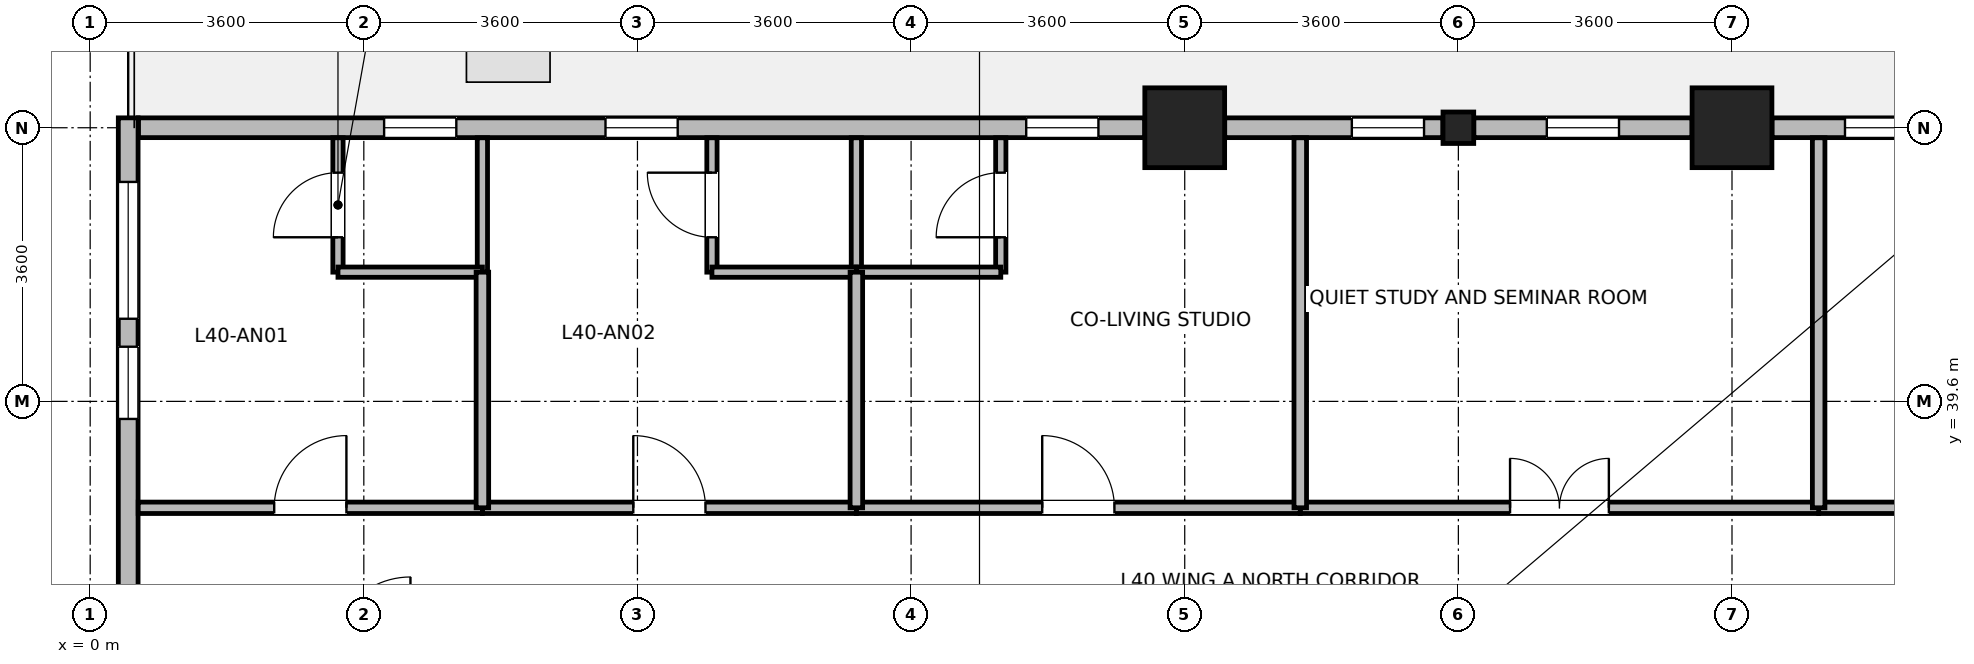
"""IFC4 building model, lengths in metres.
Left out: names, types, materials, properties, quantities, classifications, styles, units other than length and angle.
Written with IfcOpenShell. Run it as: python <this file> out.ifc"""

import sys

from ifc_helpers import new_model, si_unit, direction, frame, frame_2d, origin, origin_2d, place, context, subcontext, project, spatial, rectangle, i_section, extrude, source, transform, mapped, element, fill, save


model = new_model("IFC4")
c1 = context("Model", 3, precision=1e-05, world=origin(), true_north=direction((0.0, 1.0)))
c2 = subcontext(c1, "Body", "Model", "MODEL_VIEW")
j1 = project(units=[si_unit("LENGTHUNIT", "METRE"), si_unit("PLANEANGLEUNIT", "RADIAN")], contexts=[c1])
p1 = place(None, origin())
s1 = spatial("IfcSite", under=j1, at=p1, CompositionType="ELEMENT")
p2 = place(p1, origin())
s2 = spatial("IfcBuilding", under=s1, at=p2, CompositionType="ELEMENT")
p3 = place(p2, frame((0.0, 0.0, 158.7)))
s3 = spatial("IfcBuildingStorey", under=s2, at=p3, CompositionType="ELEMENT", Elevation=158.7)
m1 = source(origin(), c2, "Body", "SweptSolid", [
    extrude(rectangle(XDim=1.05, YDim=1.05, at=origin_2d()), origin(), (0.0, 0.0, 1.0), 3.7),
])
for number, where, z_axis, x_axis in (
    (1, (14.4, 43.2, 0.0), (0.0, 0.0, 1.0), (1.0, 0.0, 0.0)),
    (2, (21.6, 43.2, 0.0), (0.0, 0.0, 1.0), (1.0, 0.0, 0.0)),
):
    element("IfcColumn", number, at=place(p3, frame(where, z_axis=z_axis, x_axis=x_axis)), inside=s3, PredefinedType="COLUMN", context=c2, shape_type="MappedRepresentation", body=[
        mapped(m1, transform((0.0, 0.0, 0.0), x_axis=(1.0, 0.0, 0.0), y_axis=(0.0, 1.0, 0.0), z_axis=(0.0, 0.0, 1.0), scale=1.0)),
    ])
m2 = source(origin(), c2, "Body", "SweptSolid", [
    extrude(i_section(OverallWidth=0.404, OverallDepth=0.414, WebThickness=0.021, FlangeThickness=0.028, FilletRadius=0.015, at=origin_2d()), origin(), (0.0, 0.0, 1.0), 3.7),
])
p4 = place(p3, frame((18.0, 43.2, 0.0), z_axis=(0.0, 0.0, 1.0), x_axis=(1.0, 0.0, 0.0)))
e3 = element("IfcColumn", 3, at=p4, inside=s3, PredefinedType="COLUMN", context=c2, shape_type="MappedRepresentation", body=[
    mapped(m2, transform((0.0, 0.0, 0.0), x_axis=(1.0, 0.0, 0.0), y_axis=(0.0, 1.0, 0.0), z_axis=(0.0, 0.0, 1.0), scale=1.0)),
])
p5 = place(p3, frame((22.126, 43.2, 0.0), z_axis=(0.0, 0.0, 1.0), x_axis=(1.0, 0.0, 0.0)))
e4 = element("IfcWall", 4, at=p5, inside=s3, PredefinedType="STANDARD", context=c2, shape_type="SweptSolid", body=[
    extrude(rectangle(XDim=2.871, YDim=0.26, at=frame_2d((1.436, 0.0))), origin(), (0.0, 0.0, 1.0), 2.99),
])
p6 = place(p5, frame((0.96, 0.0, 0.85)))
e5 = element("IfcOpeningElement", 5, at=p6, cuts=e4, PredefinedType="OPENING", context=c2, shape_type="SweptSolid", body=[
    extrude(rectangle(XDim=0.95, YDim=1.75, at=frame_2d((0.475, 0.875))), frame((0.0, 0.14, 0.0), z_axis=(0.0, -1.0, 0.0), x_axis=(1.0, 0.0, 0.0)), (0.0, 0.0, 1.0), 0.28),
])
p7 = place(p3, frame((18.203, 43.2, 0.0), z_axis=(0.0, 0.0, 1.0), x_axis=(1.0, 0.0, 0.0)))
e6 = element("IfcWall", 6, at=p7, inside=s3, PredefinedType="STANDARD", context=c2, shape_type="SweptSolid", body=[
    extrude(rectangle(XDim=2.871, YDim=0.26, at=frame_2d((1.436, 0.0))), origin(), (0.0, 0.0, 1.0), 2.99),
])
p8 = place(p7, frame((0.96, 0.0, 0.85)))
e7 = element("IfcOpeningElement", 7, at=p8, cuts=e6, PredefinedType="OPENING", context=c2, shape_type="SweptSolid", body=[
    extrude(rectangle(XDim=0.95, YDim=1.75, at=frame_2d((0.475, 0.875))), frame((0.0, 0.14, 0.0), z_axis=(0.0, -1.0, 0.0), x_axis=(1.0, 0.0, 0.0)), (0.0, 0.0, 1.0), 0.28),
])
p9 = place(p3, frame((14.926, 43.2, 0.0), z_axis=(0.0, 0.0, 1.0), x_axis=(1.0, 0.0, 0.0)))
e8 = element("IfcWall", 8, at=p9, inside=s3, PredefinedType="STANDARD", context=c2, shape_type="SweptSolid", body=[
    extrude(rectangle(XDim=2.871, YDim=0.26, at=frame_2d((1.436, 0.0))), origin(), (0.0, 0.0, 1.0), 2.99),
])
p10 = place(p9, frame((1.673, 0.0, 0.85)))
e9 = element("IfcOpeningElement", 9, at=p10, cuts=e8, PredefinedType="OPENING", context=c2, shape_type="SweptSolid", body=[
    extrude(rectangle(XDim=0.95, YDim=1.75, at=frame_2d((0.475, 0.875))), frame((0.0, 0.14, 0.0), z_axis=(0.0, -1.0, 0.0), x_axis=(1.0, 0.0, 0.0)), (0.0, 0.0, 1.0), 0.28),
])
p11 = place(p3, frame((0.635, 43.2, 0.0), z_axis=(0.0, 0.0, 1.0), x_axis=(1.0, 0.0, 0.0)))
e10 = element("IfcWall", 10, at=p11, inside=s3, PredefinedType="STANDARD", context=c2, shape_type="SweptSolid", body=[
    extrude(rectangle(XDim=13.239, YDim=0.26, at=frame_2d((6.62, 0.0))), origin(), (0.0, 0.0, 1.0), 3.44),
])
p12 = place(p11, frame((6.145, 0.0, 0.85)))
e11 = element("IfcOpeningElement", 11, at=p12, cuts=e10, PredefinedType="OPENING", context=c2, shape_type="SweptSolid", body=[
    extrude(rectangle(XDim=0.95, YDim=1.75, at=frame_2d((0.475, 0.875))), frame((0.0, 0.14, 0.0), z_axis=(0.0, -1.0, 0.0), x_axis=(1.0, 0.0, 0.0)), (0.0, 0.0, 1.0), 0.28),
])
p13 = place(p11, frame((3.232, 0.0, 0.85)))
e12 = element("IfcOpeningElement", 12, at=p13, cuts=e10, PredefinedType="OPENING", context=c2, shape_type="SweptSolid", body=[
    extrude(rectangle(XDim=0.95, YDim=1.75, at=frame_2d((0.475, 0.875))), frame((0.0, 0.14, 0.0), z_axis=(0.0, -1.0, 0.0), x_axis=(1.0, 0.0, 0.0)), (0.0, 0.0, 1.0), 0.28),
])
p14 = place(p11, frame((11.679, 0.0, 0.85)))
e13 = element("IfcOpeningElement", 13, at=p14, cuts=e10, PredefinedType="OPENING", context=c2, shape_type="SweptSolid", body=[
    extrude(rectangle(XDim=0.95, YDim=1.75, at=frame_2d((0.475, 0.875))), frame((0.0, 0.14, 0.0), z_axis=(0.0, -1.0, 0.0), x_axis=(1.0, 0.0, 0.0)), (0.0, 0.0, 1.0), 0.28),
])
p15 = place(p3, frame((0.5, 36.358, 0.0), z_axis=(0.0, 0.0, 1.0), x_axis=(0.0, 1.0, 0.0)))
e14 = element("IfcWall", 14, at=p15, inside=s3, PredefinedType="STANDARD", context=c2, shape_type="SweptSolid", body=[
    extrude(rectangle(XDim=6.972, YDim=0.26, at=frame_2d((3.486, 0.0))), origin(), (0.0, 0.0, 1.0), 3.44),
])
p16 = place(p15, frame((4.329, 0.0, 0.85)))
e15 = element("IfcOpeningElement", 15, at=p16, cuts=e14, PredefinedType="OPENING", context=c2, shape_type="SweptSolid", body=[
    extrude(rectangle(XDim=1.8, YDim=1.85, at=frame_2d((0.9, 0.925))), frame((0.0, 0.14, 0.0), z_axis=(0.0, -1.0, 0.0), x_axis=(1.0, 0.0, 0.0)), (0.0, 0.0, 1.0), 0.28),
])
p17 = place(p15, frame((3.011, 0.0, 0.85)))
e16 = element("IfcOpeningElement", 16, at=p17, cuts=e14, PredefinedType="OPENING", context=c2, shape_type="SweptSolid", body=[
    extrude(rectangle(XDim=0.95, YDim=1.75, at=frame_2d((0.475, 0.875))), frame((0.0, 0.14, 0.0), z_axis=(0.0, -1.0, 0.0), x_axis=(1.0, 0.0, 0.0)), (0.0, 0.0, 1.0), 0.28),
])
p18 = place(p3, frame((3.26, 41.3, 0.0), z_axis=(0.0, 0.0, 1.0), x_axis=(0.0, 1.0, 0.0)))
e17 = element("IfcWall", 17, at=p18, inside=s3, PredefinedType="PARTITIONING", context=c2, shape_type="SweptSolid", body=[
    extrude(rectangle(XDim=1.768, YDim=0.135, at=frame_2d((0.884, 0.0))), origin(), (0.0, 0.0, 1.0), 3.44),
])
p19 = place(p18, frame((0.459, 0.0, 0.0)))
e18 = element("IfcOpeningElement", 18, at=p19, cuts=e17, PredefinedType="OPENING", context=c2, shape_type="SweptSolid", body=[
    extrude(rectangle(XDim=0.85, YDim=2.04, at=frame_2d((0.425, 1.02))), frame((0.0, 0.078, 0.0), z_axis=(0.0, -1.0, 0.0), x_axis=(1.0, 0.0, 0.0)), (0.0, 0.0, 1.0), 0.155),
])
p20 = place(p3, frame((5.16, 41.3, 0.0), z_axis=(0.0, 0.0, 1.0), x_axis=(0.0, 1.0, 0.0)))
e19 = element("IfcWall", 19, at=p20, inside=s3, PredefinedType="PARTITIONING", context=c2, shape_type="SweptSolid", body=[
    extrude(rectangle(XDim=1.768, YDim=0.135, at=frame_2d((0.884, 0.0))), origin(), (0.0, 0.0, 1.0), 3.44),
])
p21 = place(p3, frame((8.18, 41.3, 0.0), z_axis=(0.0, 0.0, 1.0), x_axis=(0.0, 1.0, 0.0)))
e20 = element("IfcWall", 20, at=p21, inside=s3, PredefinedType="PARTITIONING", context=c2, shape_type="SweptSolid", body=[
    extrude(rectangle(XDim=1.768, YDim=0.135, at=frame_2d((0.884, 0.0))), origin(), (0.0, 0.0, 1.0), 3.44),
])
p22 = place(p21, frame((0.459, 0.0, 0.0)))
e21 = element("IfcOpeningElement", 21, at=p22, cuts=e20, PredefinedType="OPENING", context=c2, shape_type="SweptSolid", body=[
    extrude(rectangle(XDim=0.85, YDim=2.04, at=frame_2d((0.425, 1.02))), frame((0.0, 0.078, 0.0), z_axis=(0.0, -1.0, 0.0), x_axis=(1.0, 0.0, 0.0)), (0.0, 0.0, 1.0), 0.155),
])
p23 = place(p3, frame((10.08, 41.3, 0.0), z_axis=(0.0, 0.0, 1.0), x_axis=(0.0, 1.0, 0.0)))
e22 = element("IfcWall", 22, at=p23, inside=s3, PredefinedType="PARTITIONING", context=c2, shape_type="SweptSolid", body=[
    extrude(rectangle(XDim=1.768, YDim=0.135, at=frame_2d((0.884, 0.0))), origin(), (0.0, 0.0, 1.0), 3.44),
])
p24 = place(p3, frame((11.98, 41.3, 0.0), z_axis=(0.0, 0.0, 1.0), x_axis=(0.0, 1.0, 0.0)))
e23 = element("IfcWall", 23, at=p24, inside=s3, PredefinedType="PARTITIONING", context=c2, shape_type="SweptSolid", body=[
    extrude(rectangle(XDim=1.768, YDim=0.135, at=frame_2d((0.884, 0.0))), origin(), (0.0, 0.0, 1.0), 3.44),
])
p25 = place(p24, frame((0.459, 0.0, 0.0)))
e24 = element("IfcOpeningElement", 24, at=p25, cuts=e23, PredefinedType="OPENING", context=c2, shape_type="SweptSolid", body=[
    extrude(rectangle(XDim=0.85, YDim=2.04, at=frame_2d((0.425, 1.02))), frame((0.0, 0.078, 0.0), z_axis=(0.0, -1.0, 0.0), x_axis=(1.0, 0.0, 0.0)), (0.0, 0.0, 1.0), 0.155),
])
p26 = place(p3, frame((3.26, 41.3, 0.0), z_axis=(0.0, 0.0, 1.0), x_axis=(1.0, 0.0, 0.0)))
e25 = element("IfcWall", 25, at=p26, inside=s3, PredefinedType="PARTITIONING", context=c2, shape_type="SweptSolid", body=[
    extrude(rectangle(XDim=1.9, YDim=0.135, at=frame_2d((0.95, 0.0))), origin(), (0.0, 0.0, 1.0), 3.44),
])
p27 = place(p3, frame((8.18, 41.3, 0.0), z_axis=(0.0, 0.0, 1.0), x_axis=(1.0, 0.0, 0.0)))
e26 = element("IfcWall", 26, at=p27, inside=s3, PredefinedType="PARTITIONING", context=c2, shape_type="SweptSolid", body=[
    extrude(rectangle(XDim=1.9, YDim=0.135, at=frame_2d((0.95, 0.0))), origin(), (0.0, 0.0, 1.0), 3.44),
])
p28 = place(p3, frame((10.08, 41.3, 0.0), z_axis=(0.0, 0.0, 1.0), x_axis=(1.0, 0.0, 0.0)))
e27 = element("IfcWall", 27, at=p28, inside=s3, PredefinedType="PARTITIONING", context=c2, shape_type="SweptSolid", body=[
    extrude(rectangle(XDim=1.9, YDim=0.135, at=frame_2d((0.95, 0.0))), origin(), (0.0, 0.0, 1.0), 3.44),
])
p29 = place(p3, frame((22.74, 38.2, 0.0), z_axis=(0.0, 0.0, 1.0), x_axis=(1.0, 0.0, 0.0)))
e28 = element("IfcWall", 28, at=p29, inside=s3, PredefinedType="PARTITIONING", context=c2, shape_type="SweptSolid", body=[
    extrude(rectangle(XDim=7.82, YDim=0.15, at=frame_2d((3.91, 0.0))), origin(), (0.0, 0.0, 1.0), 3.44),
])
p30 = place(p29, frame((3.46, 0.0, 0.0)))
e29 = element("IfcOpeningElement", 29, at=p30, cuts=e28, PredefinedType="OPENING", context=c2, shape_type="SweptSolid", body=[
    extrude(rectangle(XDim=0.9, YDim=2.08, at=frame_2d((0.45, 1.04))), frame((0.0, 0.085, 0.0), z_axis=(0.0, -1.0, 0.0), x_axis=(1.0, 0.0, 0.0)), (0.0, 0.0, 1.0), 0.17),
])
p31 = place(p3, frame((15.92, 38.2, 0.0), z_axis=(0.0, 0.0, 1.0), x_axis=(1.0, 0.0, 0.0)))
e30 = element("IfcWall", 30, at=p31, inside=s3, PredefinedType="PARTITIONING", context=c2, shape_type="SweptSolid", body=[
    extrude(rectangle(XDim=6.82, YDim=0.15, at=frame_2d((3.41, 0.0))), origin(), (0.0, 0.0, 1.0), 3.44),
])
p32 = place(p31, frame((2.76, 0.0, 0.0)))
e31 = element("IfcOpeningElement", 31, at=p32, cuts=e30, PredefinedType="OPENING", context=c2, shape_type="SweptSolid", body=[
    extrude(rectangle(XDim=1.3, YDim=2.12, at=frame_2d((0.65, 1.06))), frame((0.0, 0.085, 0.0), z_axis=(0.0, -1.0, 0.0), x_axis=(1.0, 0.0, 0.0)), (0.0, 0.0, 1.0), 0.17),
])
p33 = place(p3, frame((10.08, 38.2, 0.0), z_axis=(0.0, 0.0, 1.0), x_axis=(1.0, 0.0, 0.0)))
e32 = element("IfcWall", 32, at=p33, inside=s3, PredefinedType="PARTITIONING", context=c2, shape_type="SweptSolid", body=[
    extrude(rectangle(XDim=5.84, YDim=0.15, at=frame_2d((2.92, 0.0))), origin(), (0.0, 0.0, 1.0), 3.44),
])
p34 = place(p33, frame((2.445, 0.0, 0.0)))
e33 = element("IfcOpeningElement", 33, at=p34, cuts=e32, PredefinedType="OPENING", context=c2, shape_type="SweptSolid", body=[
    extrude(rectangle(XDim=0.95, YDim=2.1, at=frame_2d((0.475, 1.05))), frame((0.0, 0.085, 0.0), z_axis=(0.0, -1.0, 0.0), x_axis=(1.0, 0.0, 0.0)), (0.0, 0.0, 1.0), 0.17),
])
p35 = place(p3, frame((5.16, 38.2, 0.0), z_axis=(0.0, 0.0, 1.0), x_axis=(1.0, 0.0, 0.0)))
e34 = element("IfcWall", 34, at=p35, inside=s3, PredefinedType="PARTITIONING", context=c2, shape_type="SweptSolid", body=[
    extrude(rectangle(XDim=4.92, YDim=0.15, at=frame_2d((2.46, 0.0))), origin(), (0.0, 0.0, 1.0), 3.44),
])
p36 = place(p35, frame((1.985, 0.0, 0.0)))
e35 = element("IfcOpeningElement", 35, at=p36, cuts=e34, PredefinedType="OPENING", context=c2, shape_type="SweptSolid", body=[
    extrude(rectangle(XDim=0.95, YDim=2.1, at=frame_2d((0.475, 1.05))), frame((0.0, 0.085, 0.0), z_axis=(0.0, -1.0, 0.0), x_axis=(1.0, 0.0, 0.0)), (0.0, 0.0, 1.0), 0.17),
])
p37 = place(p3, frame((0.632, 38.2, 0.0), z_axis=(0.0, 0.0, 1.0), x_axis=(1.0, 0.0, 0.0)))
e36 = element("IfcWall", 36, at=p37, inside=s3, PredefinedType="PARTITIONING", context=c2, shape_type="SweptSolid", body=[
    extrude(rectangle(XDim=4.528, YDim=0.15, at=frame_2d((2.264, 0.0))), origin(), (0.0, 0.0, 1.0), 3.44),
])
p38 = place(p37, frame((1.789, 0.0, 0.0)))
e37 = element("IfcOpeningElement", 37, at=p38, cuts=e36, PredefinedType="OPENING", context=c2, shape_type="SweptSolid", body=[
    extrude(rectangle(XDim=0.95, YDim=2.1, at=frame_2d((0.475, 1.05))), frame((0.0, 0.085, 0.0), z_axis=(0.0, -1.0, 0.0), x_axis=(1.0, 0.0, 0.0)), (0.0, 0.0, 1.0), 0.17),
])
for number, where, z_axis, x_axis in (
    (38, (15.92, 38.2, 0.0), (0.0, 0.0, 1.0), (0.0, 1.0, 0.0)),
    (39, (22.74, 38.2, 0.0), (0.0, 0.0, 1.0), (0.0, 1.0, 0.0)),
):
    element("IfcWall", number, at=place(p3, frame(where, z_axis=z_axis, x_axis=x_axis)), inside=s3, PredefinedType="PARTITIONING", context=c2, shape_type="SweptSolid", body=[
        extrude(rectangle(XDim=4.868, YDim=0.165, at=frame_2d((2.434, 0.0))), origin(), (0.0, 0.0, 1.0), 3.44),
    ])
for number, where, z_axis, x_axis in (
    (40, (5.16, 38.2, 0.0), (0.0, 0.0, 1.0), (0.0, 1.0, 0.0)),
    (41, (10.08, 38.2, 0.0), (0.0, 0.0, 1.0), (0.0, 1.0, 0.0)),
):
    element("IfcWall", number, at=place(p3, frame(where, z_axis=z_axis, x_axis=x_axis)), inside=s3, PredefinedType="PARTITIONING", context=c2, shape_type="SweptSolid", body=[
        extrude(rectangle(XDim=3.1, YDim=0.165, at=frame_2d((1.55, 0.0))), origin(), (0.0, 0.0, 1.0), 3.44),
    ])
p39 = place(p6, origin())
e42 = element("IfcWindow", 42, at=p39, inside=s3, PartitioningType="SINGLE_PANEL", PredefinedType="WINDOW", context=c2, shape_type="SweptSolid", body=[
    extrude(rectangle(XDim=0.95, YDim=1.75, at=frame_2d((0.475, 0.875))), frame((0.0, 0.03, 0.0), z_axis=(0.0, -1.0, 0.0), x_axis=(1.0, 0.0, 0.0)), (0.0, 0.0, 1.0), 0.06),
])
fill(e5, e42)
p40 = place(p8, origin())
e43 = element("IfcWindow", 43, at=p40, inside=s3, PartitioningType="SINGLE_PANEL", PredefinedType="WINDOW", context=c2, shape_type="SweptSolid", body=[
    extrude(rectangle(XDim=0.95, YDim=1.75, at=frame_2d((0.475, 0.875))), frame((0.0, 0.03, 0.0), z_axis=(0.0, -1.0, 0.0), x_axis=(1.0, 0.0, 0.0)), (0.0, 0.0, 1.0), 0.06),
])
fill(e7, e43)
p41 = place(p10, origin())
e44 = element("IfcWindow", 44, at=p41, inside=s3, PartitioningType="SINGLE_PANEL", PredefinedType="WINDOW", context=c2, shape_type="SweptSolid", body=[
    extrude(rectangle(XDim=0.95, YDim=1.75, at=frame_2d((0.475, 0.875))), frame((0.0, 0.03, 0.0), z_axis=(0.0, -1.0, 0.0), x_axis=(1.0, 0.0, 0.0)), (0.0, 0.0, 1.0), 0.06),
])
fill(e9, e44)
p42 = place(p12, origin())
e45 = element("IfcWindow", 45, at=p42, inside=s3, PartitioningType="SINGLE_PANEL", PredefinedType="WINDOW", context=c2, shape_type="SweptSolid", body=[
    extrude(rectangle(XDim=0.95, YDim=1.75, at=frame_2d((0.475, 0.875))), frame((0.0, 0.03, 0.0), z_axis=(0.0, -1.0, 0.0), x_axis=(1.0, 0.0, 0.0)), (0.0, 0.0, 1.0), 0.06),
])
fill(e11, e45)
p43 = place(p13, origin())
e46 = element("IfcWindow", 46, at=p43, inside=s3, PartitioningType="SINGLE_PANEL", PredefinedType="WINDOW", context=c2, shape_type="SweptSolid", body=[
    extrude(rectangle(XDim=0.95, YDim=1.75, at=frame_2d((0.475, 0.875))), frame((0.0, 0.03, 0.0), z_axis=(0.0, -1.0, 0.0), x_axis=(1.0, 0.0, 0.0)), (0.0, 0.0, 1.0), 0.06),
])
fill(e12, e46)
p44 = place(p14, origin())
e47 = element("IfcWindow", 47, at=p44, inside=s3, PartitioningType="SINGLE_PANEL", PredefinedType="WINDOW", context=c2, shape_type="SweptSolid", body=[
    extrude(rectangle(XDim=0.95, YDim=1.75, at=frame_2d((0.475, 0.875))), frame((0.0, 0.03, 0.0), z_axis=(0.0, -1.0, 0.0), x_axis=(1.0, 0.0, 0.0)), (0.0, 0.0, 1.0), 0.06),
])
fill(e13, e47)
p45 = place(p16, origin())
e48 = element("IfcWindow", 48, at=p45, inside=s3, PartitioningType="SINGLE_PANEL", PredefinedType="WINDOW", context=c2, shape_type="SweptSolid", body=[
    extrude(rectangle(XDim=1.8, YDim=1.85, at=frame_2d((0.9, 0.925))), frame((0.0, 0.03, 0.0), z_axis=(0.0, -1.0, 0.0), x_axis=(1.0, 0.0, 0.0)), (0.0, 0.0, 1.0), 0.06),
])
fill(e15, e48)
p46 = place(p17, origin())
e49 = element("IfcWindow", 49, at=p46, inside=s3, PartitioningType="SINGLE_PANEL", PredefinedType="WINDOW", context=c2, shape_type="SweptSolid", body=[
    extrude(rectangle(XDim=0.95, YDim=1.75, at=frame_2d((0.475, 0.875))), frame((0.0, 0.03, 0.0), z_axis=(0.0, -1.0, 0.0), x_axis=(1.0, 0.0, 0.0)), (0.0, 0.0, 1.0), 0.06),
])
fill(e16, e49)
p47 = place(p19, origin())
e50 = element("IfcDoor", 50, at=p47, inside=s3, OperationType="SINGLE_SWING_LEFT", PredefinedType="DOOR", context=c2, shape_type="SweptSolid", body=[
    extrude(rectangle(XDim=0.85, YDim=2.04, at=frame_2d((0.425, 1.02))), frame((0.0, 0.025, 0.0), z_axis=(0.0, -1.0, 0.0), x_axis=(1.0, 0.0, 0.0)), (0.0, 0.0, 1.0), 0.05),
])
fill(e18, e50)
p48 = place(p22, origin())
e51 = element("IfcDoor", 51, at=p48, inside=s3, OperationType="SINGLE_SWING_RIGHT", PredefinedType="DOOR", context=c2, shape_type="SweptSolid", body=[
    extrude(rectangle(XDim=0.85, YDim=2.04, at=frame_2d((0.425, 1.02))), frame((0.0, 0.025, 0.0), z_axis=(0.0, -1.0, 0.0), x_axis=(1.0, 0.0, 0.0)), (0.0, 0.0, 1.0), 0.05),
])
fill(e21, e51)
p49 = place(p25, origin())
e52 = element("IfcDoor", 52, at=p49, inside=s3, OperationType="SINGLE_SWING_LEFT", PredefinedType="DOOR", context=c2, shape_type="SweptSolid", body=[
    extrude(rectangle(XDim=0.85, YDim=2.04, at=frame_2d((0.425, 1.02))), frame((0.0, 0.025, 0.0), z_axis=(0.0, -1.0, 0.0), x_axis=(1.0, 0.0, 0.0)), (0.0, 0.0, 1.0), 0.05),
])
fill(e24, e52)
p50 = place(p32, origin())
e53 = element("IfcDoor", 53, at=p50, inside=s3, OperationType="DOUBLE_DOOR_SINGLE_SWING", PredefinedType="DOOR", context=c2, shape_type="SweptSolid", body=[
    extrude(rectangle(XDim=1.3, YDim=2.12, at=frame_2d((0.65, 1.06))), frame((0.0, 0.025, 0.0), z_axis=(0.0, -1.0, 0.0), x_axis=(1.0, 0.0, 0.0)), (0.0, 0.0, 1.0), 0.05),
])
fill(e31, e53)
p51 = place(p34, origin())
e54 = element("IfcDoor", 54, at=p51, inside=s3, OperationType="SINGLE_SWING_LEFT", PredefinedType="DOOR", context=c2, shape_type="SweptSolid", body=[
    extrude(rectangle(XDim=0.95, YDim=2.1, at=frame_2d((0.475, 1.05))), frame((0.0, 0.025, 0.0), z_axis=(0.0, -1.0, 0.0), x_axis=(1.0, 0.0, 0.0)), (0.0, 0.0, 1.0), 0.05),
])
fill(e33, e54)
p52 = place(p36, origin())
e55 = element("IfcDoor", 55, at=p52, inside=s3, OperationType="SINGLE_SWING_LEFT", PredefinedType="DOOR", context=c2, shape_type="SweptSolid", body=[
    extrude(rectangle(XDim=0.95, YDim=2.1, at=frame_2d((0.475, 1.05))), frame((0.0, 0.025, 0.0), z_axis=(0.0, -1.0, 0.0), x_axis=(1.0, 0.0, 0.0)), (0.0, 0.0, 1.0), 0.05),
])
fill(e35, e55)
p53 = place(p38, origin())
e56 = element("IfcDoor", 56, at=p53, inside=s3, OperationType="SINGLE_SWING_RIGHT", PredefinedType="DOOR", context=c2, shape_type="SweptSolid", body=[
    extrude(rectangle(XDim=0.95, YDim=2.1, at=frame_2d((0.475, 1.05))), frame((0.0, 0.025, 0.0), z_axis=(0.0, -1.0, 0.0), x_axis=(1.0, 0.0, 0.0)), (0.0, 0.0, 1.0), 0.05),
])
fill(e37, e56)
save(model, sys.argv[1])
